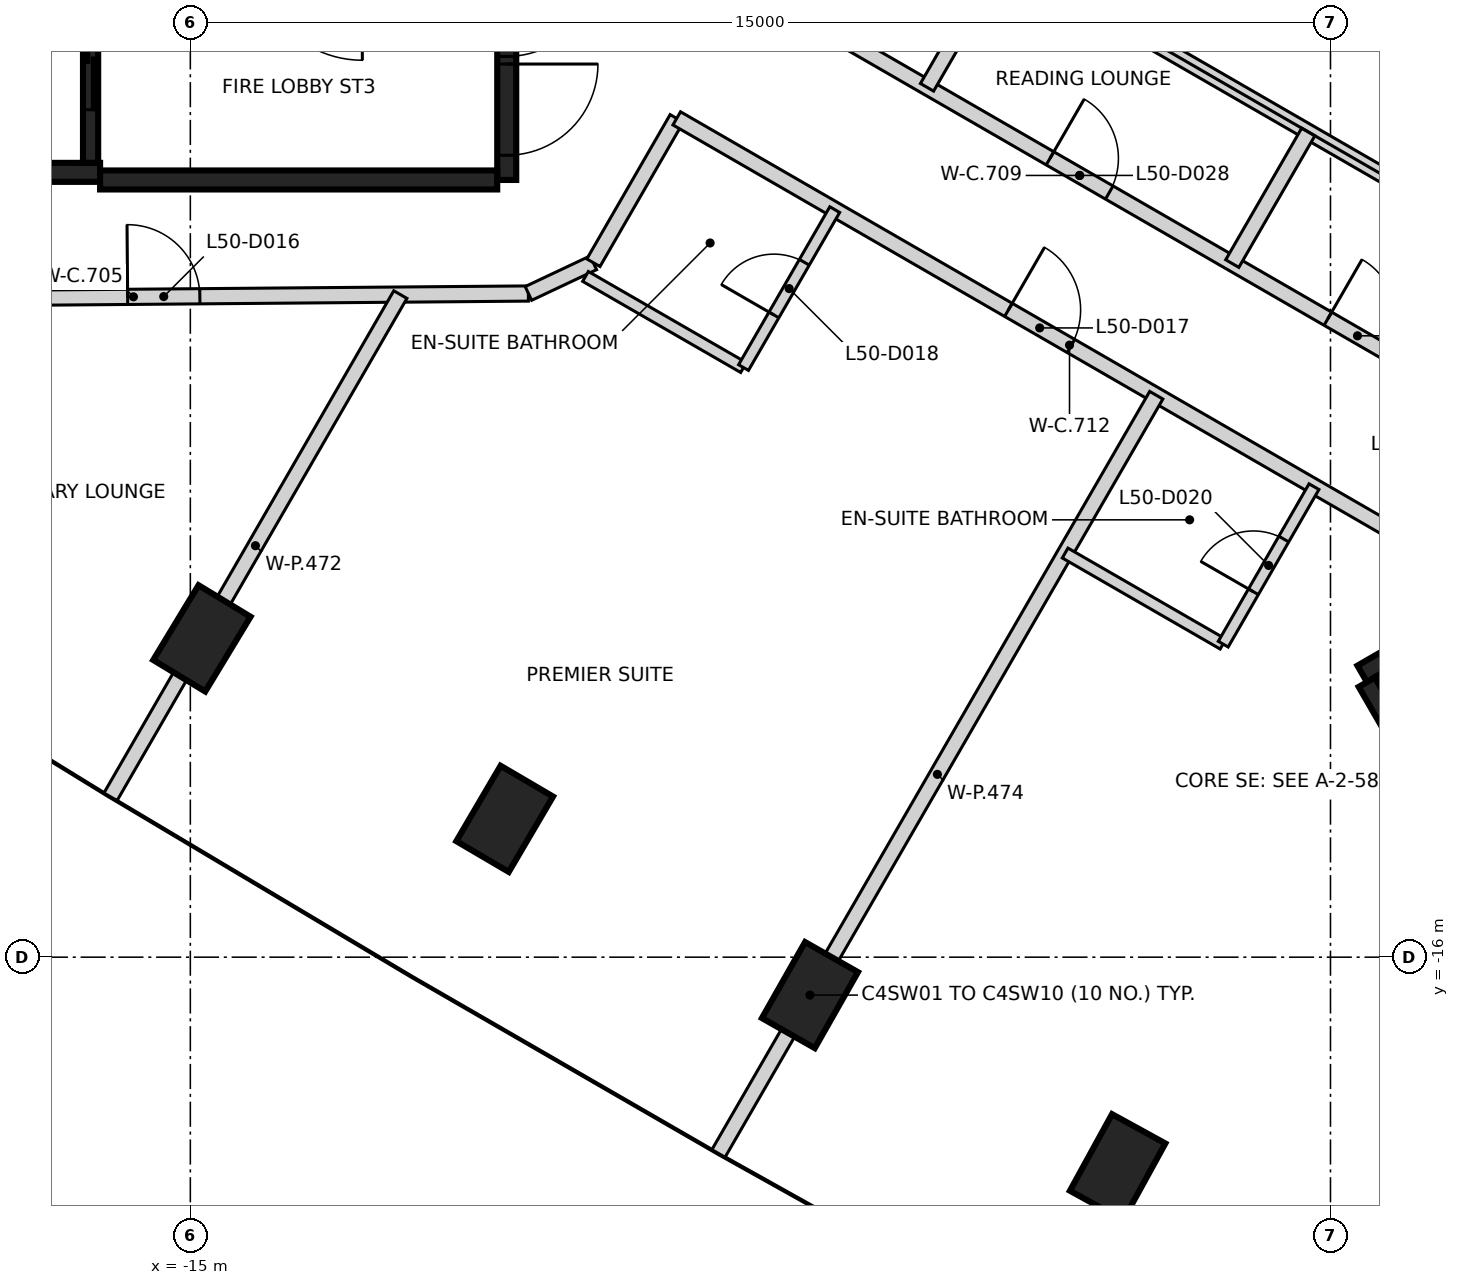
"""IFC4 building model, lengths in metres.
Left out: names, types, materials, properties, quantities, classifications, styles, units other than length and angle.
Written with IfcOpenShell. Run it as: python <this file> out.ifc"""

import sys

from ifc_helpers import new_model, si_unit, direction, frame, frame_2d, origin, origin_2d, place, context, subcontext, project, spatial, rectangle, extrude, element, fill, save


model = new_model("IFC4")
c1 = context("Model", 3, precision=1e-05, world=origin(), true_north=direction((0.0, 1.0)))
c2 = subcontext(c1, "Body", "Model", "MODEL_VIEW")
j1 = project(units=[si_unit("LENGTHUNIT", "METRE"), si_unit("PLANEANGLEUNIT", "RADIAN")], contexts=[c1])
p1 = place(None, origin())
s1 = spatial("IfcSite", under=j1, at=p1, CompositionType="ELEMENT")
p2 = place(p1, origin())
s2 = spatial("IfcBuilding", under=s1, at=p2, CompositionType="ELEMENT")
p3 = place(p2, frame((0.0, 0.0, 200.8)))
s3 = spatial("IfcBuildingStorey", under=s2, at=p3, CompositionType="ELEMENT", Elevation=200.8)
for number, where, z_axis, x_axis in (
    (1, (-14.848, -11.806, -0.35), (0.0, 0.0, 1.0), (0.518, 0.855, 0.0)),
    (2, (-10.864, -14.18, -0.35), (0.0, 0.0, 1.0), (0.506, 0.862, 0.0)),
    (3, (-6.848, -16.499, -0.35), (0.0, 0.0, 1.0), (0.494, 0.87, 0.0)),
    (4, (-2.8, -18.762, -0.35), (0.0, 0.0, 1.0), (0.482, 0.876, 0.0)),
):
    element("IfcColumn", number, at=place(p3, frame(where, z_axis=z_axis, x_axis=x_axis)), inside=s3, PredefinedType="COLUMN", context=c2, shape_type="SweptSolid", body=[
        extrude(rectangle(XDim=1.15, YDim=0.8, at=origin_2d()), origin(), (0.0, 0.0, 1.0), 3.6),
    ])
p4 = place(p3, frame((-10.837, 5.775, 0.0), z_axis=(0.0, 0.0, 1.0), x_axis=(0.0, -1.0, 0.0)))
e5 = element("IfcWall", 5, at=p4, inside=s3, PredefinedType="SHEAR", context=c2, shape_type="SweptSolid", body=[
    extrude(rectangle(XDim=11.55, YDim=0.25, at=frame_2d((5.775, 0.0))), origin(), (0.0, 0.0, 1.0), 3.25),
])
p5 = place(p4, frame((10.025, 0.0, 0.0)))
e6 = element("IfcOpeningElement", 6, at=p5, cuts=e5, PredefinedType="OPENING", context=c2, shape_type="SweptSolid", body=[
    extrude(rectangle(XDim=1.2, YDim=2.1, at=frame_2d((0.6, 1.05))), frame((0.0, 0.135, 0.0), z_axis=(0.0, -1.0, 0.0), x_axis=(1.0, 0.0, 0.0)), (0.0, 0.0, 1.0), 0.27),
])
p6 = place(p4, frame((8.725, 0.0, 0.0)))
e7 = element("IfcOpeningElement", 7, at=p6, cuts=e5, PredefinedType="OPENING", context=c2, shape_type="SweptSolid", body=[
    extrude(rectangle(XDim=1.2, YDim=2.1, at=frame_2d((0.6, 1.05))), frame((0.0, 0.135, 0.0), z_axis=(0.0, -1.0, 0.0), x_axis=(1.0, 0.0, 0.0)), (0.0, 0.0, 1.0), 0.27),
])
p7 = place(p3, frame((-16.187, -5.675, 0.0), z_axis=(0.0, 0.0, 1.0), x_axis=(-1.0, 0.0, 0.0)))
e8 = element("IfcWall", 8, at=p7, inside=s3, PredefinedType="SHEAR", context=c2, shape_type="SweptSolid", body=[
    extrude(rectangle(XDim=6.125, YDim=0.25, at=frame_2d((3.062, 0.0))), origin(), (0.0, 0.0, 1.0), 3.25),
])
p8 = place(p7, frame((3.563, 0.0, 0.0)))
e9 = element("IfcOpeningElement", 9, at=p8, cuts=e8, PredefinedType="OPENING", context=c2, shape_type="SweptSolid", body=[
    extrude(rectangle(XDim=1.0, YDim=2.1, at=frame_2d((0.5, 1.05))), frame((0.0, 0.135, 0.0), z_axis=(0.0, -1.0, 0.0), x_axis=(1.0, 0.0, 0.0)), (0.0, 0.0, 1.0), 0.27),
])
p9 = place(p3, frame((-10.963, -5.775, 0.0), z_axis=(0.0, 0.0, 1.0), x_axis=(-1.0, 0.0, 0.0)))
e10 = element("IfcWall", 10, at=p9, inside=s3, PredefinedType="SHEAR", context=c2, shape_type="SweptSolid", body=[
    extrude(rectangle(XDim=5.225, YDim=0.25, at=frame_2d((2.612, 0.0))), origin(), (0.0, 0.0, 1.0), 3.25),
])
p10 = place(p3, frame((-16.312, -2.898, 0.0), z_axis=(0.0, 0.0, 1.0), x_axis=(0.0, -1.0, 0.0)))
e11 = element("IfcWall", 11, at=p10, inside=s3, PredefinedType="SHEAR", context=c2, shape_type="SweptSolid", body=[
    extrude(rectangle(XDim=2.651, YDim=0.2, at=frame_2d((1.325, 0.0))), origin(), (0.0, 0.0, 1.0), 3.25),
])
p11 = place(p10, frame((0.652, 0.0, 0.0)))
e12 = element("IfcOpeningElement", 12, at=p11, cuts=e11, PredefinedType="OPENING", context=c2, shape_type="SweptSolid", body=[
    extrude(rectangle(XDim=1.3, YDim=2.1, at=frame_2d((0.65, 1.05))), frame((0.0, 0.11, 0.0), z_axis=(0.0, -1.0, 0.0), x_axis=(1.0, 0.0, 0.0)), (0.0, 0.0, 1.0), 0.22),
])
p12 = place(p3, frame((0.417, -12.273, 0.0), z_axis=(0.0, 0.0, 1.0), x_axis=(0.866021906294, 0.500006057782, 0.0)))
e13 = element("IfcWall", 13, at=p12, inside=s3, PredefinedType="SHEAR", context=c2, shape_type="SweptSolid", body=[
    extrude(rectangle(XDim=11.55, YDim=0.25, at=frame_2d((5.775, 0.0))), origin(), (0.0, 0.0, 1.0), 3.25),
])
p13 = place(p12, frame((10.025, 0.0, 0.0)))
e14 = element("IfcOpeningElement", 14, at=p13, cuts=e13, PredefinedType="OPENING", context=c2, shape_type="SweptSolid", body=[
    extrude(rectangle(XDim=1.2, YDim=2.1, at=frame_2d((0.6, 1.05))), frame((0.0, 0.135, 0.0), z_axis=(0.0, -1.0, 0.0), x_axis=(1.0, 0.0, 0.0)), (0.0, 0.0, 1.0), 0.27),
])
p14 = place(p12, frame((8.725, 0.0, 0.0)))
e15 = element("IfcOpeningElement", 15, at=p14, cuts=e13, PredefinedType="OPENING", context=c2, shape_type="SweptSolid", body=[
    extrude(rectangle(XDim=1.2, YDim=2.1, at=frame_2d((0.6, 1.05))), frame((0.0, 0.135, 0.0), z_axis=(0.0, -1.0, 0.0), x_axis=(1.0, 0.0, 0.0)), (0.0, 0.0, 1.0), 0.27),
])
p15 = place(p3, frame((3.235, -17.153, 0.0), z_axis=(0.0, 0.0, 1.0), x_axis=(-0.500008851346, 0.866020293397, 0.0)))
e16 = element("IfcWall", 16, at=p15, inside=s3, PredefinedType="SHEAR", context=c2, shape_type="SweptSolid", body=[
    extrude(rectangle(XDim=5.51, YDim=0.25, at=frame_2d((2.755, 0.0))), origin(), (0.0, 0.0, 1.0), 3.25),
])
p16 = place(p3, frame((-20.944, -7.356, 0.0), z_axis=(0.0, 0.0, 1.0), x_axis=(0.999964824566, 0.00838746869, 0.0)))
e17 = element("IfcWall", 17, at=p16, inside=s3, PredefinedType="PARTITIONING", context=c2, shape_type="SweptSolid", body=[
    extrude(rectangle(XDim=10.391, YDim=0.2, at=frame_2d((5.196, 0.0))), origin(), (0.0, 0.0, 1.0), 3.25),
])
p17 = place(p16, frame((1.22, 0.0, 0.0)))
e18 = element("IfcOpeningElement", 18, at=p17, cuts=e17, PredefinedType="OPENING", context=c2, shape_type="SweptSolid", body=[
    extrude(rectangle(XDim=0.9, YDim=2.1, at=frame_2d((0.45, 1.05))), frame((0.0, 0.11, 0.0), z_axis=(0.0, -1.0, 0.0), x_axis=(1.0, 0.0, 0.0)), (0.0, 0.0, 1.0), 0.22),
])
p18 = place(p16, frame((5.119, 0.0, 0.0)))
e19 = element("IfcOpeningElement", 19, at=p18, cuts=e17, PredefinedType="OPENING", context=c2, shape_type="SweptSolid", body=[
    extrude(rectangle(XDim=0.95, YDim=2.1, at=frame_2d((0.475, 1.05))), frame((0.0, 0.11, 0.0), z_axis=(0.0, -1.0, 0.0), x_axis=(1.0, 0.0, 0.0)), (0.0, 0.0, 1.0), 0.22),
])
p19 = place(p3, frame((-10.552, -7.268, 0.0), z_axis=(0.0, 0.0, 1.0), x_axis=(0.904331815333, 0.426830139255, 0.0)))
e20 = element("IfcWall", 20, at=p19, inside=s3, PredefinedType="PARTITIONING", context=c2, shape_type="SweptSolid", body=[
    extrude(rectangle(XDim=0.944, YDim=0.2, at=frame_2d((0.472, 0.0))), origin(), (0.0, 0.0, 1.0), 3.25),
])
p20 = place(p3, frame((-9.697, -6.864, 0.0), z_axis=(0.0, 0.0, 1.0), x_axis=(0.499863831834, 0.866104006239, 0.0)))
e21 = element("IfcWall", 21, at=p20, inside=s3, PredefinedType="PARTITIONING", context=c2, shape_type="SweptSolid", body=[
    extrude(rectangle(XDim=2.192, YDim=0.2, at=frame_2d((1.096, 0.0))), origin(), (0.0, 0.0, 1.0), 3.25),
])
p21 = place(p3, frame((-8.612, -2.649, 0.0), z_axis=(0.0, 0.0, 1.0), x_axis=(0.866060983284, -0.499938369435, 0.0)))
e22 = element("IfcWall", 22, at=p21, inside=s3, PredefinedType="PARTITIONING", context=c2, shape_type="SweptSolid", body=[
    extrude(rectangle(XDim=12.268, YDim=0.2, at=frame_2d((6.134, 0.0))), origin(), (0.0, 0.0, 1.0), 3.25),
])
p22 = place(p21, frame((1.463, 0.0, 0.0)))
e23 = element("IfcOpeningElement", 23, at=p22, cuts=e22, PredefinedType="OPENING", context=c2, shape_type="SweptSolid", body=[
    extrude(rectangle(XDim=0.9, YDim=2.1, at=frame_2d((0.45, 1.05))), frame((0.0, 0.11, 0.0), z_axis=(0.0, -1.0, 0.0), x_axis=(1.0, 0.0, 0.0)), (0.0, 0.0, 1.0), 0.22),
])
p23 = place(p21, frame((5.683, 0.0, 0.0)))
e24 = element("IfcOpeningElement", 24, at=p23, cuts=e22, PredefinedType="OPENING", context=c2, shape_type="SweptSolid", body=[
    extrude(rectangle(XDim=0.9, YDim=2.1, at=frame_2d((0.45, 1.05))), frame((0.0, 0.11, 0.0), z_axis=(0.0, -1.0, 0.0), x_axis=(1.0, 0.0, 0.0)), (0.0, 0.0, 1.0), 0.22),
])
p24 = place(p21, frame((9.904, 0.0, 0.0)))
e25 = element("IfcOpeningElement", 25, at=p24, cuts=e22, PredefinedType="OPENING", context=c2, shape_type="SweptSolid", body=[
    extrude(rectangle(XDim=0.9, YDim=2.1, at=frame_2d((0.45, 1.05))), frame((0.0, 0.11, 0.0), z_axis=(0.0, -1.0, 0.0), x_axis=(1.0, 0.0, 0.0)), (0.0, 0.0, 1.0), 0.22),
])
p25 = place(p3, frame((-8.601, -4.965, 0.0), z_axis=(0.0, 0.0, 1.0), x_axis=(0.866011155539, -0.500024677872, 0.0)))
e26 = element("IfcWall", 26, at=p25, inside=s3, PredefinedType="PARTITIONING", context=c2, shape_type="SweptSolid", body=[
    extrude(rectangle(XDim=11.934, YDim=0.2, at=frame_2d((5.967, 0.0))), origin(), (0.0, 0.0, 1.0), 3.25),
])
p26 = place(p25, frame((5.039, 0.0, 0.0)))
e27 = element("IfcOpeningElement", 27, at=p26, cuts=e26, PredefinedType="OPENING", context=c2, shape_type="SweptSolid", body=[
    extrude(rectangle(XDim=0.95, YDim=2.1, at=frame_2d((0.475, 1.05))), frame((0.0, 0.11, 0.0), z_axis=(0.0, -1.0, 0.0), x_axis=(1.0, 0.0, 0.0)), (0.0, 0.0, 1.0), 0.22),
])
p27 = place(p25, frame((10.784, 0.0, 0.0)))
e28 = element("IfcOpeningElement", 28, at=p27, cuts=e26, PredefinedType="OPENING", context=c2, shape_type="SweptSolid", body=[
    extrude(rectangle(XDim=0.95, YDim=2.1, at=frame_2d((0.475, 1.05))), frame((0.0, 0.11, 0.0), z_axis=(0.0, -1.0, 0.0), x_axis=(1.0, 0.0, 0.0)), (0.0, 0.0, 1.0), 0.22),
])
p28 = place(p3, frame((-16.05, -13.89, 0.0), z_axis=(0.0, 0.0, 1.0), x_axis=(0.499849898665, 0.866112047488, 0.0)))
e29 = element("IfcWall", 29, at=p28, inside=s3, PredefinedType="PARTITIONING", context=c2, shape_type="SweptSolid", body=[
    extrude(rectangle(XDim=7.628, YDim=0.2, at=frame_2d((3.814, 0.0))), origin(), (0.0, 0.0, 1.0), 3.25),
])
p29 = place(p3, frame((-8.052, -18.582, 0.0), z_axis=(0.0, 0.0, 1.0), x_axis=(0.500025795397, 0.866010510293, 0.0)))
e30 = element("IfcWall", 30, at=p29, inside=s3, PredefinedType="PARTITIONING", context=c2, shape_type="SweptSolid", body=[
    extrude(rectangle(XDim=11.519, YDim=0.2, at=frame_2d((5.759, 0.0))), origin(), (0.0, 0.0, 1.0), 3.25),
])
p30 = place(p3, frame((-7.6, -0.924, 0.0), z_axis=(0.0, 0.0, 1.0), x_axis=(0.866073324109, -0.499916990376, 0.0)))
e31 = element("IfcWall", 31, at=p30, inside=s3, PredefinedType="PARTITIONING", context=c2, shape_type="SweptSolid", body=[
    extrude(rectangle(XDim=12.24, YDim=0.2, at=frame_2d((6.12, 0.0))), origin(), (0.0, 0.0, 1.0), 3.25),
])
for number, where, z_axis, x_axis in (
    (32, (-5.308, -4.556, 0.0), (0.0, 0.0, 1.0), (0.5, 0.866, 0.0)),
    (33, (-1.292, -6.875, 0.0), (0.0, 0.0, 1.0), (0.5, 0.866, 0.0)),
):
    element("IfcWall", number, at=place(p3, frame(where, z_axis=z_axis, x_axis=x_axis)), inside=s3, PredefinedType="PARTITIONING", context=c2, shape_type="SweptSolid", body=[
        extrude(rectangle(XDim=2.0, YDim=0.2, at=frame_2d((1.0, 0.0))), origin(), (0.0, 0.0, 1.0), 3.25),
    ])
p31 = place(p3, frame((-9.801, -7.044, 0.0), z_axis=(0.0, 0.0, 1.0), x_axis=(0.866277021052, -0.499563932643, 0.0)))
e34 = element("IfcWall", 34, at=p31, inside=s3, PredefinedType="PARTITIONING", context=c2, shape_type="SweptSolid", body=[
    extrude(rectangle(XDim=2.4, YDim=0.15, at=frame_2d((1.2, 0.0))), origin(), (0.0, 0.0, 1.0), 3.25),
])
p32 = place(p3, frame((-7.722, -8.243, 0.0), z_axis=(0.0, 0.0, 1.0), x_axis=(0.500089422704, 0.865973769406, 0.0)))
e35 = element("IfcWall", 35, at=p32, inside=s3, PredefinedType="PARTITIONING", context=c2, shape_type="SweptSolid", body=[
    extrude(rectangle(XDim=2.399, YDim=0.15, at=frame_2d((1.2, 0.0))), origin(), (0.0, 0.0, 1.0), 3.25),
])
p33 = place(p32, frame((0.8, 0.0, 0.0)))
e36 = element("IfcOpeningElement", 36, at=p33, cuts=e35, PredefinedType="OPENING", context=c2, shape_type="SweptSolid", body=[
    extrude(rectangle(XDim=0.8, YDim=2.1, at=frame_2d((0.4, 1.05))), frame((0.0, 0.085, 0.0), z_axis=(0.0, -1.0, 0.0), x_axis=(1.0, 0.0, 0.0)), (0.0, 0.0, 1.0), 0.17),
])
p34 = place(p3, frame((-3.491, -10.683, 0.0), z_axis=(0.0, 0.0, 1.0), x_axis=(0.866249990711, -0.499610802118, 0.0)))
e37 = element("IfcWall", 37, at=p34, inside=s3, PredefinedType="PARTITIONING", context=c2, shape_type="SweptSolid", body=[
    extrude(rectangle(XDim=2.398, YDim=0.15, at=frame_2d((1.199, 0.0))), origin(), (0.0, 0.0, 1.0), 3.25),
])
p35 = place(p3, frame((-1.411, -11.882, 0.0), z_axis=(0.0, 0.0, 1.0), x_axis=(0.49923627015, 0.866465894635, 0.0)))
e38 = element("IfcWall", 38, at=p35, inside=s3, PredefinedType="PARTITIONING", context=c2, shape_type="SweptSolid", body=[
    extrude(rectangle(XDim=2.391, YDim=0.15, at=frame_2d((1.196, 0.0))), origin(), (0.0, 0.0, 1.0), 3.25),
])
p36 = place(p35, frame((0.796, 0.0, 0.0)))
e39 = element("IfcOpeningElement", 39, at=p36, cuts=e38, PredefinedType="OPENING", context=c2, shape_type="SweptSolid", body=[
    extrude(rectangle(XDim=0.8, YDim=2.1, at=frame_2d((0.4, 1.05))), frame((0.0, 0.085, 0.0), z_axis=(0.0, -1.0, 0.0), x_axis=(1.0, 0.0, 0.0)), (0.0, 0.0, 1.0), 0.17),
])
p37 = place(p11, origin())
e40 = element("IfcDoor", 40, at=p37, inside=s3, OperationType="SLIDING_TO_RIGHT", PredefinedType="DOOR", context=c2, shape_type="SweptSolid", body=[
    extrude(rectangle(XDim=1.3, YDim=2.1, at=frame_2d((0.65, 1.05))), frame((0.0, 0.025, 0.0), z_axis=(0.0, -1.0, 0.0), x_axis=(1.0, 0.0, 0.0)), (0.0, 0.0, 1.0), 0.05),
])
fill(e12, e40)
p38 = place(p5, origin())
e41 = element("IfcDoor", 41, at=p38, inside=s3, OperationType="SINGLE_SWING_LEFT", PredefinedType="DOOR", context=c2, shape_type="SweptSolid", body=[
    extrude(rectangle(XDim=1.2, YDim=2.1, at=frame_2d((0.6, 1.05))), frame((0.0, 0.025, 0.0), z_axis=(0.0, -1.0, 0.0), x_axis=(1.0, 0.0, 0.0)), (0.0, 0.0, 1.0), 0.05),
])
fill(e6, e41)
p39 = place(p6, origin())
e42 = element("IfcDoor", 42, at=p39, inside=s3, OperationType="SINGLE_SWING_RIGHT", PredefinedType="DOOR", context=c2, shape_type="SweptSolid", body=[
    extrude(rectangle(XDim=1.2, YDim=2.1, at=frame_2d((0.6, 1.05))), frame((0.0, 0.025, 0.0), z_axis=(0.0, -1.0, 0.0), x_axis=(1.0, 0.0, 0.0)), (0.0, 0.0, 1.0), 0.05),
])
fill(e7, e42)
p40 = place(p18, frame((0.95, 0.0, 0.0), z_axis=(0.0, 0.0, 1.0), x_axis=(-1.0, 0.0, 0.0)))
e43 = element("IfcDoor", 43, at=p40, inside=s3, OperationType="SINGLE_SWING_LEFT", PredefinedType="DOOR", context=c2, shape_type="SweptSolid", body=[
    extrude(rectangle(XDim=0.95, YDim=2.1, at=frame_2d((0.475, 1.05))), frame((0.0, 0.025, 0.0), z_axis=(0.0, -1.0, 0.0), x_axis=(1.0, 0.0, 0.0)), (0.0, 0.0, 1.0), 0.05),
])
fill(e19, e43)
p41 = place(p26, frame((0.95, 0.0, 0.0), z_axis=(0.0, 0.0, 1.0), x_axis=(-1.0, 0.0, 0.0)))
e44 = element("IfcDoor", 44, at=p41, inside=s3, OperationType="SINGLE_SWING_LEFT", PredefinedType="DOOR", context=c2, shape_type="SweptSolid", body=[
    extrude(rectangle(XDim=0.95, YDim=2.1, at=frame_2d((0.475, 1.05))), frame((0.0, 0.025, 0.0), z_axis=(0.0, -1.0, 0.0), x_axis=(1.0, 0.0, 0.0)), (0.0, 0.0, 1.0), 0.05),
])
fill(e27, e44)
p42 = place(p33, frame((0.8, 0.0, 0.0), z_axis=(0.0, 0.0, 1.0), x_axis=(-1.0, 0.0, 0.0)))
e45 = element("IfcDoor", 45, at=p42, inside=s3, OperationType="SINGLE_SWING_LEFT", PredefinedType="DOOR", context=c2, shape_type="SweptSolid", body=[
    extrude(rectangle(XDim=0.8, YDim=2.1, at=frame_2d((0.4, 1.05))), frame((0.0, 0.025, 0.0), z_axis=(0.0, -1.0, 0.0), x_axis=(1.0, 0.0, 0.0)), (0.0, 0.0, 1.0), 0.05),
])
fill(e36, e45)
p43 = place(p36, frame((0.8, 0.0, 0.0), z_axis=(0.0, 0.0, 1.0), x_axis=(-1.0, 0.0, 0.0)))
e46 = element("IfcDoor", 46, at=p43, inside=s3, OperationType="SINGLE_SWING_LEFT", PredefinedType="DOOR", context=c2, shape_type="SweptSolid", body=[
    extrude(rectangle(XDim=0.8, YDim=2.1, at=frame_2d((0.4, 1.05))), frame((0.0, 0.025, 0.0), z_axis=(0.0, -1.0, 0.0), x_axis=(1.0, 0.0, 0.0)), (0.0, 0.0, 1.0), 0.05),
])
fill(e39, e46)
p44 = place(p23, origin())
e47 = element("IfcDoor", 47, at=p44, inside=s3, OperationType="SINGLE_SWING_LEFT", PredefinedType="DOOR", context=c2, shape_type="SweptSolid", body=[
    extrude(rectangle(XDim=0.9, YDim=2.1, at=frame_2d((0.45, 1.05))), frame((0.0, 0.025, 0.0), z_axis=(0.0, -1.0, 0.0), x_axis=(1.0, 0.0, 0.0)), (0.0, 0.0, 1.0), 0.05),
])
fill(e24, e47)
p45 = place(p24, origin())
e48 = element("IfcDoor", 48, at=p45, inside=s3, OperationType="SINGLE_SWING_LEFT", PredefinedType="DOOR", context=c2, shape_type="SweptSolid", body=[
    extrude(rectangle(XDim=0.9, YDim=2.1, at=frame_2d((0.45, 1.05))), frame((0.0, 0.025, 0.0), z_axis=(0.0, -1.0, 0.0), x_axis=(1.0, 0.0, 0.0)), (0.0, 0.0, 1.0), 0.05),
])
fill(e25, e48)
save(model, sys.argv[1])
